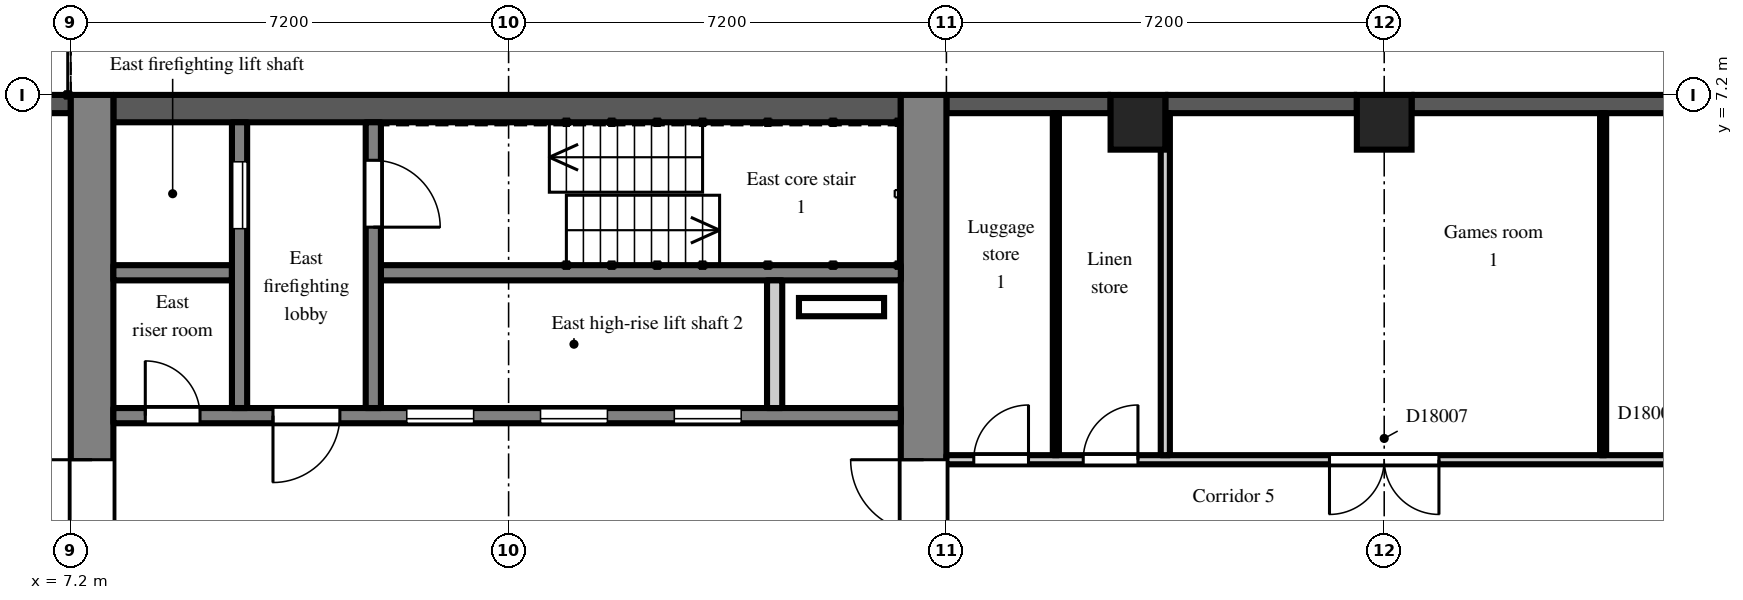
"""IFC4 building model, lengths in metres.
Left out: names, types, materials, properties, quantities, classifications, styles, units other than length and angle.
Written with IfcOpenShell. Run it as: python <this file> out.ifc"""

import sys

from ifc_helpers import new_model, si_unit, direction, frame, frame_2d, origin, origin_2d, place, context, subcontext, project, spatial, rectangle, extrude, element, fill, save


model = new_model("IFC4")
c1 = context("Model", 3, precision=1e-05, world=origin(), true_north=direction((0.0, 1.0)))
c2 = subcontext(c1, "Body", "Model", "MODEL_VIEW")
j1 = project(units=[si_unit("LENGTHUNIT", "METRE"), si_unit("PLANEANGLEUNIT", "RADIAN")], contexts=[c1])
p1 = place(None, origin())
s1 = spatial("IfcSite", under=j1, at=p1, CompositionType="ELEMENT")
p2 = place(p1, origin())
s2 = spatial("IfcBuilding", under=s1, at=p2, CompositionType="ELEMENT")
p3 = place(p2, frame((0.0, 0.0, 120.3)))
s3 = spatial("IfcBuildingStorey", under=s2, at=p3, CompositionType="ELEMENT", Elevation=120.3)
for number, where, z_axis, x_axis in (
    (1, (24.75, 6.75, 0.0), (0.0, 0.0, 1.0), (1.0, 0.0, 0.0)),
    (2, (28.8, 6.75, 0.0), (0.0, 0.0, 1.0), (1.0, 0.0, 0.0)),
):
    element("IfcColumn", number, at=place(p3, frame(where, z_axis=z_axis, x_axis=x_axis)), inside=s3, PredefinedType="COLUMN", context=c2, shape_type="SweptSolid", body=[
        extrude(rectangle(XDim=0.9, YDim=0.9, at=origin_2d()), origin(), (0.0, 0.0, 1.0), 3.0),
    ])
p4 = place(p3, frame((35.55, 7.05, 0.0), z_axis=(0.0, 0.0, 1.0), x_axis=(-1.0, 0.0, 0.0)))
e3 = element("IfcWall", 3, at=p4, inside=s3, PredefinedType="SOLIDWALL", context=c2, shape_type="SweptSolid", body=[
    extrude(rectangle(XDim=6.3, YDim=0.3, at=frame_2d((3.15, 0.0))), origin(), (0.0, 0.0, 1.0), 2.2),
])
p5 = place(p3, frame((28.35, 7.05, 0.0), z_axis=(0.0, 0.0, 1.0), x_axis=(-1.0, 0.0, 0.0)))
e4 = element("IfcWall", 4, at=p5, inside=s3, PredefinedType="SOLIDWALL", context=c2, shape_type="SweptSolid", body=[
    extrude(rectangle(XDim=3.15, YDim=0.3, at=frame_2d((1.575, 0.0))), origin(), (0.0, 0.0, 1.0), 2.2),
])
p6 = place(p3, frame((24.3, 7.05, 0.0), z_axis=(0.0, 0.0, 1.0), x_axis=(-1.0, 0.0, 0.0)))
e5 = element("IfcWall", 5, at=p6, inside=s3, PredefinedType="SOLIDWALL", context=c2, shape_type="SweptSolid", body=[
    extrude(rectangle(XDim=2.7, YDim=0.3, at=frame_2d((1.35, 0.0))), origin(), (0.0, 0.0, 1.0), 2.2),
])
p7 = place(p3, frame((7.2, 7.05, 0.0), z_axis=(0.0, 0.0, 1.0), x_axis=(-1.0, 0.0, 0.0)))
e6 = element("IfcWall", 6, at=p7, inside=s3, PredefinedType="SOLIDWALL", context=c2, shape_type="SweptSolid", body=[
    extrude(rectangle(XDim=3.0, YDim=0.3, at=frame_2d((1.5, 0.0))), origin(), (0.0, 0.0, 1.0), 2.2),
])
p8 = place(p3, frame((7.55, -7.2, 0.0), z_axis=(0.0, 0.0, 1.0), x_axis=(0.0, 1.0, 0.0)))
e7 = element("IfcWall", 7, at=p8, inside=s3, PredefinedType="SHEAR", context=c2, shape_type="SweptSolid", body=[
    extrude(rectangle(XDim=14.4, YDim=0.7, at=frame_2d((7.2, 0.0))), origin(), (0.0, 0.0, 1.0), 2.6),
])
p9 = place(p8, frame((6.0, 0.0, 0.0)))
e8 = element("IfcOpeningElement", 8, at=p9, cuts=e7, PredefinedType="OPENING", context=c2, shape_type="SweptSolid", body=[
    extrude(rectangle(XDim=2.4, YDim=2.2, at=frame_2d((1.2, 1.1))), frame((0.0, 0.36, 0.0), z_axis=(0.0, -1.0, 0.0), x_axis=(1.0, 0.0, 0.0)), (0.0, 0.0, 1.0), 0.72),
])
p10 = place(p3, frame((21.225, -7.2, 0.0), z_axis=(0.0, 0.0, 1.0), x_axis=(0.0, 1.0, 0.0)))
e9 = element("IfcWall", 9, at=p10, inside=s3, PredefinedType="SHEAR", context=c2, shape_type="SweptSolid", body=[
    extrude(rectangle(XDim=14.4, YDim=0.75, at=frame_2d((7.2, 0.0))), origin(), (0.0, 0.0, 1.0), 2.6),
])
p11 = place(p10, frame((6.0, 0.0, 0.0)))
e10 = element("IfcOpeningElement", 10, at=p11, cuts=e9, PredefinedType="OPENING", context=c2, shape_type="SweptSolid", body=[
    extrude(rectangle(XDim=2.4, YDim=2.2, at=frame_2d((1.2, 1.1))), frame((0.0, 0.385, 0.0), z_axis=(0.0, -1.0, 0.0), x_axis=(1.0, 0.0, 0.0)), (0.0, 0.0, 1.0), 0.77),
])
p12 = place(p3, frame((7.9, 6.975, 0.0), z_axis=(0.0, 0.0, 1.0), x_axis=(1.0, 0.0, 0.0)))
e11 = element("IfcWall", 11, at=p12, inside=s3, PredefinedType="SHEAR", context=c2, shape_type="SweptSolid", body=[
    extrude(rectangle(XDim=12.95, YDim=0.45, at=frame_2d((6.475, 0.0))), origin(), (0.0, 0.0, 1.0), 2.6),
])
p13 = place(p3, frame((7.9, 1.925, 0.0), z_axis=(0.0, 0.0, 1.0), x_axis=(1.0, 0.0, 0.0)))
e12 = element("IfcWall", 12, at=p13, inside=s3, PredefinedType="SHEAR", context=c2, shape_type="SweptSolid", body=[
    extrude(rectangle(XDim=12.95, YDim=0.25, at=frame_2d((6.475, 0.0))), origin(), (0.0, 0.0, 1.0), 2.6),
])
p14 = place(p13, frame((4.825, 0.0, 0.0)))
e13 = element("IfcOpeningElement", 13, at=p14, cuts=e12, PredefinedType="OPENING", context=c2, shape_type="SweptSolid", body=[
    extrude(rectangle(XDim=1.1, YDim=2.1, at=frame_2d((0.55, 1.05))), frame((0.0, 0.135, 0.0), z_axis=(0.0, -1.0, 0.0), x_axis=(1.0, 0.0, 0.0)), (0.0, 0.0, 1.0), 0.27),
])
p15 = place(p13, frame((7.025, 0.0, 0.0)))
e14 = element("IfcOpeningElement", 14, at=p15, cuts=e12, PredefinedType="OPENING", context=c2, shape_type="SweptSolid", body=[
    extrude(rectangle(XDim=1.1, YDim=2.1, at=frame_2d((0.55, 1.05))), frame((0.0, 0.135, 0.0), z_axis=(0.0, -1.0, 0.0), x_axis=(1.0, 0.0, 0.0)), (0.0, 0.0, 1.0), 0.27),
])
p16 = place(p13, frame((9.225, 0.0, 0.0)))
e15 = element("IfcOpeningElement", 15, at=p16, cuts=e12, PredefinedType="OPENING", context=c2, shape_type="SweptSolid", body=[
    extrude(rectangle(XDim=1.1, YDim=2.1, at=frame_2d((0.55, 1.05))), frame((0.0, 0.135, 0.0), z_axis=(0.0, -1.0, 0.0), x_axis=(1.0, 0.0, 0.0)), (0.0, 0.0, 1.0), 0.27),
])
p17 = place(p13, frame((0.525, 0.0, 0.0)))
e16 = element("IfcOpeningElement", 16, at=p17, cuts=e12, PredefinedType="OPENING", context=c2, shape_type="SweptSolid", body=[
    extrude(rectangle(XDim=0.9, YDim=2.1, at=frame_2d((0.45, 1.05))), frame((0.0, 0.135, 0.0), z_axis=(0.0, -1.0, 0.0), x_axis=(1.0, 0.0, 0.0)), (0.0, 0.0, 1.0), 0.27),
])
p18 = place(p13, frame((2.625, 0.0, 0.0)))
e17 = element("IfcOpeningElement", 17, at=p18, cuts=e12, PredefinedType="OPENING", context=c2, shape_type="SweptSolid", body=[
    extrude(rectangle(XDim=1.1, YDim=2.1, at=frame_2d((0.55, 1.05))), frame((0.0, 0.135, 0.0), z_axis=(0.0, -1.0, 0.0), x_axis=(1.0, 0.0, 0.0)), (0.0, 0.0, 1.0), 0.27),
])
p19 = place(p3, frame((7.9, 4.275, 0.0), z_axis=(0.0, 0.0, 1.0), x_axis=(1.0, 0.0, 0.0)))
e18 = element("IfcWall", 18, at=p19, inside=s3, PredefinedType="SHEAR", context=c2, shape_type="SweptSolid", body=[
    extrude(rectangle(XDim=1.95, YDim=0.25, at=frame_2d((0.975, 0.0))), origin(), (0.0, 0.0, 1.0), 2.6),
])
p20 = place(p3, frame((12.3, 4.275, 0.0), z_axis=(0.0, 0.0, 1.0), x_axis=(1.0, 0.0, 0.0)))
e19 = element("IfcWall", 19, at=p20, inside=s3, PredefinedType="SHEAR", context=c2, shape_type="SweptSolid", body=[
    extrude(rectangle(XDim=8.55, YDim=0.25, at=frame_2d((4.275, 0.0))), origin(), (0.0, 0.0, 1.0), 2.6),
])
p21 = place(p3, frame((9.975, 2.05, 0.0), z_axis=(0.0, 0.0, 1.0), x_axis=(0.0, 1.0, 0.0)))
e20 = element("IfcWall", 20, at=p21, inside=s3, PredefinedType="SHEAR", context=c2, shape_type="SweptSolid", body=[
    extrude(rectangle(XDim=4.7, YDim=0.25, at=frame_2d((2.35, 0.0))), origin(), (0.0, 0.0, 1.0), 2.6),
])
p22 = place(p21, frame((2.95, 0.0, 0.0)))
e21 = element("IfcOpeningElement", 21, at=p22, cuts=e20, PredefinedType="OPENING", context=c2, shape_type="SweptSolid", body=[
    extrude(rectangle(XDim=1.1, YDim=2.1, at=frame_2d((0.55, 1.05))), frame((0.0, 0.135, 0.0), z_axis=(0.0, -1.0, 0.0), x_axis=(1.0, 0.0, 0.0)), (0.0, 0.0, 1.0), 0.27),
])
p23 = place(p3, frame((12.175, 2.05, 0.0), z_axis=(0.0, 0.0, 1.0), x_axis=(0.0, 1.0, 0.0)))
e22 = element("IfcWall", 22, at=p23, inside=s3, PredefinedType="SHEAR", context=c2, shape_type="SweptSolid", body=[
    extrude(rectangle(XDim=4.7, YDim=0.25, at=frame_2d((2.35, 0.0))), origin(), (0.0, 0.0, 1.0), 2.6),
])
p24 = place(p23, frame((2.975, 0.0, 0.0)))
e23 = element("IfcOpeningElement", 23, at=p24, cuts=e22, PredefinedType="OPENING", context=c2, shape_type="SweptSolid", body=[
    extrude(rectangle(XDim=1.1, YDim=2.1, at=frame_2d((0.55, 1.05))), frame((0.0, 0.135, 0.0), z_axis=(0.0, -1.0, 0.0), x_axis=(1.0, 0.0, 0.0)), (0.0, 0.0, 1.0), 0.27),
])
p25 = place(p3, frame((18.775, 2.05, 0.0), z_axis=(0.0, 0.0, 1.0), x_axis=(0.0, 1.0, 0.0)))
e24 = element("IfcWall", 24, at=p25, inside=s3, PredefinedType="PARTITIONING", context=c2, shape_type="SweptSolid", body=[
    extrude(rectangle(XDim=2.1, YDim=0.25, at=frame_2d((1.05, 0.0))), origin(), (0.0, 0.0, 1.0), 2.6),
])
p26 = place(p3, frame((21.6, 1.2, 0.0), z_axis=(0.0, 0.0, 1.0), x_axis=(1.0, 0.0, 0.0)))
e25 = element("IfcWall", 25, at=p26, inside=s3, PredefinedType="PARTITIONING", context=c2, shape_type="SweptSolid", body=[
    extrude(rectangle(XDim=14.9, YDim=0.15, at=frame_2d((7.45, 0.0))), origin(), (0.0, 0.0, 1.0), 2.6),
])
p27 = place(p26, frame((0.45, 0.0, 0.0)))
e26 = element("IfcOpeningElement", 26, at=p27, cuts=e25, PredefinedType="OPENING", context=c2, shape_type="SweptSolid", body=[
    extrude(rectangle(XDim=0.9, YDim=2.1, at=frame_2d((0.45, 1.05))), frame((0.0, 0.085, 0.0), z_axis=(0.0, -1.0, 0.0), x_axis=(1.0, 0.0, 0.0)), (0.0, 0.0, 1.0), 0.17),
])
p28 = place(p26, frame((2.25, 0.0, 0.0)))
e27 = element("IfcOpeningElement", 27, at=p28, cuts=e25, PredefinedType="OPENING", context=c2, shape_type="SweptSolid", body=[
    extrude(rectangle(XDim=0.9, YDim=2.1, at=frame_2d((0.45, 1.05))), frame((0.0, 0.085, 0.0), z_axis=(0.0, -1.0, 0.0), x_axis=(1.0, 0.0, 0.0)), (0.0, 0.0, 1.0), 0.17),
])
p29 = place(p26, frame((6.3, 0.0, 0.0)))
e28 = element("IfcOpeningElement", 28, at=p29, cuts=e25, PredefinedType="OPENING", context=c2, shape_type="SweptSolid", body=[
    extrude(rectangle(XDim=1.8, YDim=2.1, at=frame_2d((0.9, 1.05))), frame((0.0, 0.085, 0.0), z_axis=(0.0, -1.0, 0.0), x_axis=(1.0, 0.0, 0.0)), (0.0, 0.0, 1.0), 0.17),
])
p30 = place(p26, frame((11.95, 0.0, 0.0)))
e29 = element("IfcOpeningElement", 29, at=p30, cuts=e25, PredefinedType="OPENING", context=c2, shape_type="SweptSolid", body=[
    extrude(rectangle(XDim=1.8, YDim=2.1, at=frame_2d((0.9, 1.05))), frame((0.0, 0.085, 0.0), z_axis=(0.0, -1.0, 0.0), x_axis=(1.0, 0.0, 0.0)), (0.0, 0.0, 1.0), 0.17),
])
p31 = place(p3, frame((23.4, 1.275, 0.0), z_axis=(0.0, 0.0, 1.0), x_axis=(0.0, 1.0, 0.0)))
e30 = element("IfcWall", 30, at=p31, inside=s3, PredefinedType="PARTITIONING", context=c2, shape_type="SweptSolid", body=[
    extrude(rectangle(XDim=5.625, YDim=0.1, at=frame_2d((2.812, 0.0))), origin(), (0.0, 0.0, 1.0), 2.6),
])
p32 = place(p3, frame((25.2, 1.275, 0.0), z_axis=(0.0, 0.0, 1.0), x_axis=(0.0, 1.0, 0.0)))
e31 = element("IfcWall", 31, at=p32, inside=s3, PredefinedType="PARTITIONING", context=c2, shape_type="SweptSolid", body=[
    extrude(rectangle(XDim=5.625, YDim=0.15, at=frame_2d((2.812, 0.0))), origin(), (0.0, 0.0, 1.0), 2.6),
])
p33 = place(p3, frame((32.4, 1.275, 0.0), z_axis=(0.0, 0.0, 1.0), x_axis=(0.0, 1.0, 0.0)))
e32 = element("IfcWall", 32, at=p33, inside=s3, PredefinedType="PARTITIONING", context=c2, shape_type="SweptSolid", body=[
    extrude(rectangle(XDim=5.625, YDim=0.1, at=frame_2d((2.812, 0.0))), origin(), (0.0, 0.0, 1.0), 2.6),
])
p34 = place(p14, origin())
e33 = element("IfcDoor", 33, at=p34, inside=s3, OperationType="SLIDING_TO_LEFT", PredefinedType="DOOR", context=c2, shape_type="SweptSolid", body=[
    extrude(rectangle(XDim=1.1, YDim=2.1, at=frame_2d((0.55, 1.05))), frame((0.0, 0.025, 0.0), z_axis=(0.0, -1.0, 0.0), x_axis=(1.0, 0.0, 0.0)), (0.0, 0.0, 1.0), 0.05),
])
fill(e13, e33)
p35 = place(p15, origin())
e34 = element("IfcDoor", 34, at=p35, inside=s3, OperationType="SLIDING_TO_LEFT", PredefinedType="DOOR", context=c2, shape_type="SweptSolid", body=[
    extrude(rectangle(XDim=1.1, YDim=2.1, at=frame_2d((0.55, 1.05))), frame((0.0, 0.025, 0.0), z_axis=(0.0, -1.0, 0.0), x_axis=(1.0, 0.0, 0.0)), (0.0, 0.0, 1.0), 0.05),
])
fill(e14, e34)
p36 = place(p16, origin())
e35 = element("IfcDoor", 35, at=p36, inside=s3, OperationType="SLIDING_TO_LEFT", PredefinedType="DOOR", context=c2, shape_type="SweptSolid", body=[
    extrude(rectangle(XDim=1.1, YDim=2.1, at=frame_2d((0.55, 1.05))), frame((0.0, 0.025, 0.0), z_axis=(0.0, -1.0, 0.0), x_axis=(1.0, 0.0, 0.0)), (0.0, 0.0, 1.0), 0.05),
])
fill(e15, e35)
p37 = place(p22, origin())
e36 = element("IfcDoor", 36, at=p37, inside=s3, OperationType="SLIDING_TO_LEFT", PredefinedType="DOOR", context=c2, shape_type="SweptSolid", body=[
    extrude(rectangle(XDim=1.1, YDim=2.1, at=frame_2d((0.55, 1.05))), frame((0.0, 0.025, 0.0), z_axis=(0.0, -1.0, 0.0), x_axis=(1.0, 0.0, 0.0)), (0.0, 0.0, 1.0), 0.05),
])
fill(e21, e36)
p38 = place(p24, frame((1.1, 0.0, 0.0), z_axis=(0.0, 0.0, 1.0), x_axis=(-1.0, 0.0, 0.0)))
e37 = element("IfcDoor", 37, at=p38, inside=s3, OperationType="SINGLE_SWING_RIGHT", PredefinedType="DOOR", context=c2, shape_type="SweptSolid", body=[
    extrude(rectangle(XDim=1.1, YDim=2.1, at=frame_2d((0.55, 1.05))), frame((0.0, 0.025, 0.0), z_axis=(0.0, -1.0, 0.0), x_axis=(1.0, 0.0, 0.0)), (0.0, 0.0, 1.0), 0.05),
])
fill(e23, e37)
p39 = place(p17, origin())
e38 = element("IfcDoor", 38, at=p39, inside=s3, OperationType="SINGLE_SWING_LEFT", PredefinedType="DOOR", context=c2, shape_type="SweptSolid", body=[
    extrude(rectangle(XDim=0.9, YDim=2.1, at=frame_2d((0.45, 1.05))), frame((0.0, 0.025, 0.0), z_axis=(0.0, -1.0, 0.0), x_axis=(1.0, 0.0, 0.0)), (0.0, 0.0, 1.0), 0.05),
])
fill(e16, e38)
p40 = place(p18, frame((1.1, 0.0, 0.0), z_axis=(0.0, 0.0, 1.0), x_axis=(-1.0, 0.0, 0.0)))
e39 = element("IfcDoor", 39, at=p40, inside=s3, OperationType="SINGLE_SWING_RIGHT", PredefinedType="DOOR", context=c2, shape_type="SweptSolid", body=[
    extrude(rectangle(XDim=1.1, YDim=2.1, at=frame_2d((0.55, 1.05))), frame((0.0, 0.025, 0.0), z_axis=(0.0, -1.0, 0.0), x_axis=(1.0, 0.0, 0.0)), (0.0, 0.0, 1.0), 0.05),
])
fill(e17, e39)
p41 = place(p9, origin())
e40 = element("IfcDoor", 40, at=p41, inside=s3, OperationType="DOUBLE_DOOR_DOUBLE_SWING", PredefinedType="DOOR", context=c2, shape_type="SweptSolid", body=[
    extrude(rectangle(XDim=2.4, YDim=2.2, at=frame_2d((1.2, 1.1))), frame((0.0, 0.025, 0.0), z_axis=(0.0, -1.0, 0.0), x_axis=(1.0, 0.0, 0.0)), (0.0, 0.0, 1.0), 0.05),
])
fill(e8, e40)
p42 = place(p11, origin())
e41 = element("IfcDoor", 41, at=p42, inside=s3, OperationType="DOUBLE_DOOR_DOUBLE_SWING", PredefinedType="DOOR", context=c2, shape_type="SweptSolid", body=[
    extrude(rectangle(XDim=2.4, YDim=2.2, at=frame_2d((1.2, 1.1))), frame((0.0, 0.025, 0.0), z_axis=(0.0, -1.0, 0.0), x_axis=(1.0, 0.0, 0.0)), (0.0, 0.0, 1.0), 0.05),
])
fill(e10, e41)
p43 = place(p27, origin())
e42 = element("IfcDoor", 42, at=p43, inside=s3, OperationType="SINGLE_SWING_RIGHT", PredefinedType="DOOR", context=c2, shape_type="SweptSolid", body=[
    extrude(rectangle(XDim=0.9, YDim=2.1, at=frame_2d((0.45, 1.05))), frame((0.0, 0.025, 0.0), z_axis=(0.0, -1.0, 0.0), x_axis=(1.0, 0.0, 0.0)), (0.0, 0.0, 1.0), 0.05),
])
fill(e26, e42)
p44 = place(p28, origin())
e43 = element("IfcDoor", 43, at=p44, inside=s3, OperationType="SINGLE_SWING_RIGHT", PredefinedType="DOOR", context=c2, shape_type="SweptSolid", body=[
    extrude(rectangle(XDim=0.9, YDim=2.1, at=frame_2d((0.45, 1.05))), frame((0.0, 0.025, 0.0), z_axis=(0.0, -1.0, 0.0), x_axis=(1.0, 0.0, 0.0)), (0.0, 0.0, 1.0), 0.05),
])
fill(e27, e43)
p45 = place(p29, frame((1.8, 0.0, 0.0), z_axis=(0.0, 0.0, 1.0), x_axis=(-1.0, 0.0, 0.0)))
e44 = element("IfcDoor", 44, at=p45, inside=s3, OperationType="DOUBLE_DOOR_DOUBLE_SWING", PredefinedType="DOOR", context=c2, shape_type="SweptSolid", body=[
    extrude(rectangle(XDim=1.8, YDim=2.1, at=frame_2d((0.9, 1.05))), frame((0.0, 0.025, 0.0), z_axis=(0.0, -1.0, 0.0), x_axis=(1.0, 0.0, 0.0)), (0.0, 0.0, 1.0), 0.05),
])
fill(e28, e44)
save(model, sys.argv[1])
